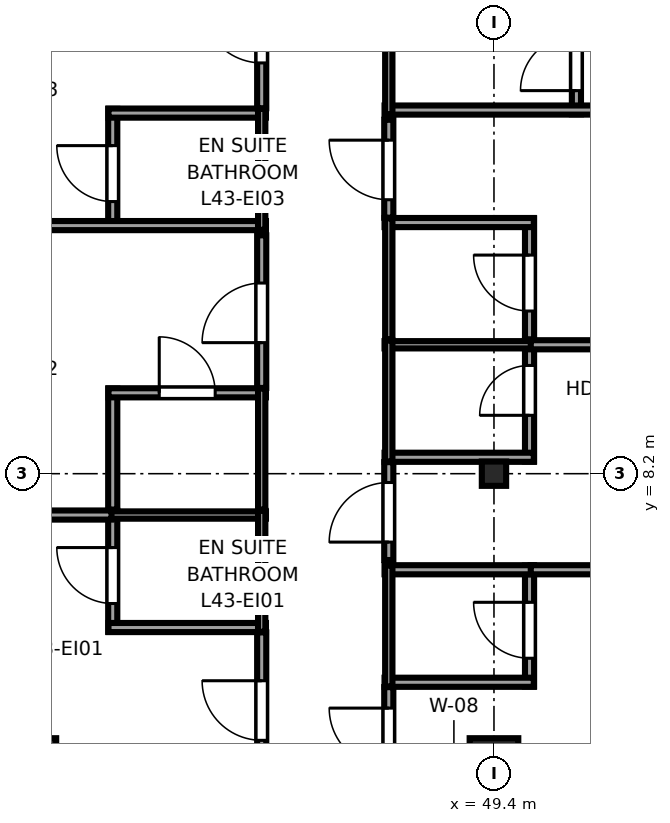
"""IFC4 building model, lengths in metres.
Left out: names, types, materials, properties, quantities, classifications, styles, units other than length and angle.
Written with IfcOpenShell. Run it as: python <this file> out.ifc"""

import sys

from ifc_helpers import new_model, si_unit, direction, frame, frame_2d, origin, origin_2d, place, context, subcontext, project, spatial, rectangle, i_section, extrude, source, transform, mapped, element, fill, save


model = new_model("IFC4")
c1 = context("Model", 3, precision=1e-05, world=origin(), true_north=direction((0.0, 1.0)))
c2 = subcontext(c1, "Body", "Model", "MODEL_VIEW")
j1 = project(units=[si_unit("LENGTHUNIT", "METRE"), si_unit("PLANEANGLEUNIT", "RADIAN")], contexts=[c1])
p1 = place(None, origin())
s1 = spatial("IfcSite", under=j1, at=p1, CompositionType="ELEMENT")
p2 = place(p1, origin())
s2 = spatial("IfcBuilding", under=s1, at=p2, CompositionType="ELEMENT")
p3 = place(p2, frame((0.0, 0.0, 164.8)))
s3 = spatial("IfcBuildingStorey", under=s2, at=p3, CompositionType="ELEMENT", Elevation=164.8)
m1 = source(origin(), c2, "Body", "SweptSolid", [
    extrude(rectangle(XDim=0.8, YDim=0.8, at=origin_2d()), origin(), (0.0, 0.0, 1.0), 3.55),
])
for number, where, z_axis, x_axis in (
    (1, (41.8, 3.45, 0.0), (0.0, 0.0, 1.0), (1.0, 0.0, 0.0)),
    (2, (49.4, 3.45, 0.0), (0.0, 0.0, 1.0), (1.0, 0.0, 0.0)),
):
    element("IfcColumn", number, at=place(p3, frame(where, z_axis=z_axis, x_axis=x_axis)), inside=s3, PredefinedType="COLUMN", context=c2, shape_type="MappedRepresentation", body=[
        mapped(m1, transform((0.0, 0.0, 0.0), x_axis=(1.0, 0.0, 0.0), y_axis=(0.0, 1.0, 0.0), z_axis=(0.0, 0.0, 1.0), scale=1.0)),
    ])
m2 = source(origin(), c2, "Body", "SweptSolid", [
    extrude(i_section(OverallWidth=0.4, OverallDepth=0.4, WebThickness=0.02, FlangeThickness=0.035, at=origin_2d()), origin(), (0.0, 0.0, 1.0), 3.55),
])
p4 = place(p3, frame((49.4, 8.2, 0.0), z_axis=(0.0, 0.0, 1.0), x_axis=(1.0, 0.0, 0.0)))
e3 = element("IfcColumn", 3, at=p4, inside=s3, PredefinedType="COLUMN", context=c2, shape_type="MappedRepresentation", body=[
    mapped(m2, transform((0.0, 0.0, 0.0), x_axis=(1.0, 0.0, 0.0), y_axis=(0.0, 1.0, 0.0), z_axis=(0.0, 0.0, 1.0), scale=1.0)),
])
p5 = place(p3, frame((43.13, 5.6, 0.0), z_axis=(0.0, 0.0, 1.0), x_axis=(0.0, 1.0, 0.0)))
e4 = element("IfcWall", 4, at=p5, inside=s3, PredefinedType="PARTITIONING", context=c2, shape_type="SweptSolid", body=[
    extrude(rectangle(XDim=1.99, YDim=0.15, at=frame_2d((0.995, 0.0))), origin(), (0.0, 0.0, 1.0), 3.37),
])
p6 = place(p5, frame((0.465, 0.0, 0.0)))
e5 = element("IfcOpeningElement", 5, at=p6, cuts=e4, PredefinedType="OPENING", context=c2, shape_type="SweptSolid", body=[
    extrude(rectangle(XDim=0.92, YDim=2.01, at=frame_2d((0.46, 1.005))), frame((0.0, 0.085, 0.0), z_axis=(0.0, -1.0, 0.0), x_axis=(1.0, 0.0, 0.0)), (0.0, 0.0, 1.0), 0.17),
])
p7 = place(p3, frame((43.06, 5.67, 0.0), z_axis=(0.0, 0.0, 1.0), x_axis=(1.0, 0.0, 0.0)))
e6 = element("IfcWall", 6, at=p7, inside=s3, PredefinedType="PARTITIONING", context=c2, shape_type="SweptSolid", body=[
    extrude(rectangle(XDim=2.59, YDim=0.15, at=frame_2d((1.295, 0.0))), origin(), (0.0, 0.0, 1.0), 3.37),
])
p8 = place(p3, frame((43.06, 7.52, 0.0), z_axis=(0.0, 0.0, 1.0), x_axis=(1.0, 0.0, 0.0)))
e7 = element("IfcWall", 7, at=p8, inside=s3, PredefinedType="PLUMBINGWALL", context=c2, shape_type="SweptSolid", body=[
    extrude(rectangle(XDim=2.59, YDim=0.12, at=frame_2d((1.295, 0.0))), origin(), (0.0, 0.0, 1.0), 3.37),
])
p9 = place(p3, frame((45.58, 5.6, 0.0), z_axis=(0.0, 0.0, 1.0), x_axis=(0.0, 1.0, 0.0)))
e8 = element("IfcWall", 8, at=p9, inside=s3, PredefinedType="PLUMBINGWALL", context=c2, shape_type="SweptSolid", body=[
    extrude(rectangle(XDim=1.99, YDim=0.12, at=frame_2d((0.995, 0.0))), origin(), (0.0, 0.0, 1.0), 3.37),
])
p10 = place(p3, frame((43.13, 7.61, 0.0), z_axis=(0.0, 0.0, 1.0), x_axis=(0.0, 1.0, 0.0)))
e9 = element("IfcWall", 9, at=p10, inside=s3, PredefinedType="PARTITIONING", context=c2, shape_type="SweptSolid", body=[
    extrude(rectangle(XDim=1.99, YDim=0.15, at=frame_2d((0.995, 0.0))), origin(), (0.0, 0.0, 1.0), 3.37),
])
p11 = place(p3, frame((43.06, 9.53, 0.0), z_axis=(0.0, 0.0, 1.0), x_axis=(1.0, 0.0, 0.0)))
e10 = element("IfcWall", 10, at=p11, inside=s3, PredefinedType="PARTITIONING", context=c2, shape_type="SweptSolid", body=[
    extrude(rectangle(XDim=2.59, YDim=0.15, at=frame_2d((1.295, 0.0))), origin(), (0.0, 0.0, 1.0), 3.37),
])
p12 = place(p11, frame((0.835, 0.0, 0.0)))
e11 = element("IfcOpeningElement", 11, at=p12, cuts=e10, PredefinedType="OPENING", context=c2, shape_type="SweptSolid", body=[
    extrude(rectangle(XDim=0.92, YDim=2.01, at=frame_2d((0.46, 1.005))), frame((0.0, 0.085, 0.0), z_axis=(0.0, -1.0, 0.0), x_axis=(1.0, 0.0, 0.0)), (0.0, 0.0, 1.0), 0.17),
])
p13 = place(p3, frame((45.58, 7.61, 0.0), z_axis=(0.0, 0.0, 1.0), x_axis=(0.0, 1.0, 0.0)))
e12 = element("IfcWall", 12, at=p13, inside=s3, PredefinedType="PLUMBINGWALL", context=c2, shape_type="SweptSolid", body=[
    extrude(rectangle(XDim=1.99, YDim=0.12, at=frame_2d((0.995, 0.0))), origin(), (0.0, 0.0, 1.0), 3.001),
])
p14 = place(p3, frame((43.13, 12.21, 0.0), z_axis=(0.0, 0.0, 1.0), x_axis=(0.0, 1.0, 0.0)))
e13 = element("IfcWall", 13, at=p14, inside=s3, PredefinedType="PARTITIONING", context=c2, shape_type="SweptSolid", body=[
    extrude(rectangle(XDim=1.99, YDim=0.15, at=frame_2d((0.995, 0.0))), origin(), (0.0, 0.0, 1.0), 3.37),
])
p15 = place(p14, frame((0.465, 0.0, 0.0)))
e14 = element("IfcOpeningElement", 14, at=p15, cuts=e13, PredefinedType="OPENING", context=c2, shape_type="SweptSolid", body=[
    extrude(rectangle(XDim=0.92, YDim=2.01, at=frame_2d((0.46, 1.005))), frame((0.0, 0.085, 0.0), z_axis=(0.0, -1.0, 0.0), x_axis=(1.0, 0.0, 0.0)), (0.0, 0.0, 1.0), 0.17),
])
p16 = place(p3, frame((34.65, 12.28, 0.0), z_axis=(0.0, 0.0, 1.0), x_axis=(1.0, 0.0, 0.0)))
e15 = element("IfcWall", 15, at=p16, inside=s3, PredefinedType="PARTITIONING", context=c2, shape_type="SweptSolid", body=[
    extrude(rectangle(XDim=11.0, YDim=0.15, at=frame_2d((5.5, 0.0))), origin(), (0.0, 0.0, 1.0), 3.37),
])
p17 = place(p3, frame((43.06, 14.13, 0.0), z_axis=(0.0, 0.0, 1.0), x_axis=(1.0, 0.0, 0.0)))
e16 = element("IfcWall", 16, at=p17, inside=s3, PredefinedType="PARTITIONING", context=c2, shape_type="SweptSolid", body=[
    extrude(rectangle(XDim=2.59, YDim=0.15, at=frame_2d((1.295, 0.0))), origin(), (0.0, 0.0, 1.0), 3.37),
])
p18 = place(p3, frame((45.58, 12.21, 0.0), z_axis=(0.0, 0.0, 1.0), x_axis=(0.0, 1.0, 0.0)))
e17 = element("IfcWall", 17, at=p18, inside=s3, PredefinedType="PLUMBINGWALL", context=c2, shape_type="SweptSolid", body=[
    extrude(rectangle(XDim=1.99, YDim=0.12, at=frame_2d((0.995, 0.0))), origin(), (0.0, 0.0, 1.0), 3.001),
])
p19 = place(p3, frame((49.985, 4.7, 0.0), z_axis=(0.0, 0.0, 1.0), x_axis=(0.0, 1.0, 0.0)))
e18 = element("IfcWall", 18, at=p19, inside=s3, PredefinedType="PARTITIONING", context=c2, shape_type="SweptSolid", body=[
    extrude(rectangle(XDim=1.99, YDim=0.15, at=frame_2d((0.995, 0.0))), origin(), (0.0, 0.0, 1.0), 3.37),
])
p20 = place(p19, frame((0.465, 0.0, 0.0)))
e19 = element("IfcOpeningElement", 19, at=p20, cuts=e18, PredefinedType="OPENING", context=c2, shape_type="SweptSolid", body=[
    extrude(rectangle(XDim=0.92, YDim=2.01, at=frame_2d((0.46, 1.005))), frame((0.0, 0.085, 0.0), z_axis=(0.0, -1.0, 0.0), x_axis=(1.0, 0.0, 0.0)), (0.0, 0.0, 1.0), 0.17),
])
p21 = place(p3, frame((47.6, 4.77, 0.0), z_axis=(0.0, 0.0, 1.0), x_axis=(1.0, 0.0, 0.0)))
e20 = element("IfcWall", 20, at=p21, inside=s3, PredefinedType="PARTITIONING", context=c2, shape_type="SweptSolid", body=[
    extrude(rectangle(XDim=2.455, YDim=0.15, at=frame_2d((1.228, 0.0))), origin(), (0.0, 0.0, 1.0), 2.832),
])
p22 = place(p3, frame((47.6, 6.62, 0.0), z_axis=(0.0, 0.0, 1.0), x_axis=(1.0, 0.0, 0.0)))
e21 = element("IfcWall", 21, at=p22, inside=s3, PredefinedType="PARTITIONING", context=c2, shape_type="SweptSolid", body=[
    extrude(rectangle(XDim=2.455, YDim=0.15, at=frame_2d((1.228, 0.0))), origin(), (0.0, 0.0, 1.0), 3.37),
])
p23 = place(p3, frame((47.67, 4.7, 0.0), z_axis=(0.0, 0.0, 1.0), x_axis=(0.0, 1.0, 0.0)))
e22 = element("IfcWall", 22, at=p23, inside=s3, PredefinedType="PLUMBINGWALL", context=c2, shape_type="SweptSolid", body=[
    extrude(rectangle(XDim=1.99, YDim=0.12, at=frame_2d((0.995, 0.0))), origin(), (0.0, 0.0, 1.0), 3.37),
])
p24 = place(p3, frame((49.985, 8.4, 0.0), z_axis=(0.0, 0.0, 1.0), x_axis=(0.0, 1.0, 0.0)))
e23 = element("IfcWall", 23, at=p24, inside=s3, PredefinedType="PARTITIONING", context=c2, shape_type="SweptSolid", body=[
    extrude(rectangle(XDim=1.99, YDim=0.15, at=frame_2d((0.995, 0.0))), origin(), (0.0, 0.0, 1.0), 3.37),
])
p25 = place(p24, frame((0.76, 0.0, 0.0)))
e24 = element("IfcOpeningElement", 24, at=p25, cuts=e23, PredefinedType="OPENING", context=c2, shape_type="SweptSolid", body=[
    extrude(rectangle(XDim=0.82, YDim=2.01, at=frame_2d((0.41, 1.005))), frame((0.0, 0.085, 0.0), z_axis=(0.0, -1.0, 0.0), x_axis=(1.0, 0.0, 0.0)), (0.0, 0.0, 1.0), 0.17),
])
p26 = place(p3, frame((47.6, 8.47, 0.0), z_axis=(0.0, 0.0, 1.0), x_axis=(1.0, 0.0, 0.0)))
e25 = element("IfcWall", 25, at=p26, inside=s3, PredefinedType="PARTITIONING", context=c2, shape_type="SweptSolid", body=[
    extrude(rectangle(XDim=2.455, YDim=0.15, at=frame_2d((1.228, 0.0))), origin(), (0.0, 0.0, 1.0), 3.37),
])
p27 = place(p3, frame((47.6, 10.32, 0.0), z_axis=(0.0, 0.0, 1.0), x_axis=(1.0, 0.0, 0.0)))
e26 = element("IfcWall", 26, at=p27, inside=s3, PredefinedType="PLUMBINGWALL", context=c2, shape_type="SweptSolid", body=[
    extrude(rectangle(XDim=2.455, YDim=0.12, at=frame_2d((1.228, 0.0))), origin(), (0.0, 0.0, 1.0), 3.37),
])
p28 = place(p3, frame((47.67, 8.4, 0.0), z_axis=(0.0, 0.0, 1.0), x_axis=(0.0, 1.0, 0.0)))
e27 = element("IfcWall", 27, at=p28, inside=s3, PredefinedType="PLUMBINGWALL", context=c2, shape_type="SweptSolid", body=[
    extrude(rectangle(XDim=1.99, YDim=0.12, at=frame_2d((0.995, 0.0))), origin(), (0.0, 0.0, 1.0), 3.37),
])
p29 = place(p3, frame((49.985, 10.41, 0.0), z_axis=(0.0, 0.0, 1.0), x_axis=(0.0, 1.0, 0.0)))
e28 = element("IfcWall", 28, at=p29, inside=s3, PredefinedType="PARTITIONING", context=c2, shape_type="SweptSolid", body=[
    extrude(rectangle(XDim=1.99, YDim=0.15, at=frame_2d((0.995, 0.0))), origin(), (0.0, 0.0, 1.0), 3.37),
])
p30 = place(p29, frame((0.465, 0.0, 0.0)))
e29 = element("IfcOpeningElement", 29, at=p30, cuts=e28, PredefinedType="OPENING", context=c2, shape_type="SweptSolid", body=[
    extrude(rectangle(XDim=0.92, YDim=2.01, at=frame_2d((0.46, 1.005))), frame((0.0, 0.085, 0.0), z_axis=(0.0, -1.0, 0.0), x_axis=(1.0, 0.0, 0.0)), (0.0, 0.0, 1.0), 0.17),
])
p31 = place(p3, frame((47.6, 12.33, 0.0), z_axis=(0.0, 0.0, 1.0), x_axis=(1.0, 0.0, 0.0)))
e30 = element("IfcWall", 30, at=p31, inside=s3, PredefinedType="PARTITIONING", context=c2, shape_type="SweptSolid", body=[
    extrude(rectangle(XDim=2.455, YDim=0.15, at=frame_2d((1.228, 0.0))), origin(), (0.0, 0.0, 1.0), 3.37),
])
p32 = place(p3, frame((47.67, 10.41, 0.0), z_axis=(0.0, 0.0, 1.0), x_axis=(0.0, 1.0, 0.0)))
e31 = element("IfcWall", 31, at=p32, inside=s3, PredefinedType="PLUMBINGWALL", context=c2, shape_type="SweptSolid", body=[
    extrude(rectangle(XDim=1.99, YDim=0.12, at=frame_2d((0.995, 0.0))), origin(), (0.0, 0.0, 1.0), 3.37),
])
p33 = place(p3, frame((50.756, 14.11, 0.0), z_axis=(0.0, 0.0, 1.0), x_axis=(0.0, 1.0, 0.0)))
e32 = element("IfcWall", 32, at=p33, inside=s3, PredefinedType="PARTITIONING", context=c2, shape_type="SweptSolid", body=[
    extrude(rectangle(XDim=1.839, YDim=0.15, at=frame_2d((0.919, 0.0))), origin(), (0.0, 0.0, 1.0), 3.37),
])
p34 = place(p33, frame((0.389, 0.0, 0.0)))
e33 = element("IfcOpeningElement", 33, at=p34, cuts=e32, PredefinedType="OPENING", context=c2, shape_type="SweptSolid", body=[
    extrude(rectangle(XDim=0.92, YDim=2.01, at=frame_2d((0.46, 1.005))), frame((0.0, 0.085, 0.0), z_axis=(0.0, -1.0, 0.0), x_axis=(1.0, 0.0, 0.0)), (0.0, 0.0, 1.0), 0.17),
])
p35 = place(p3, frame((47.6, 14.18, 0.0), z_axis=(0.0, 0.0, 1.0), x_axis=(1.0, 0.0, 0.0)))
e34 = element("IfcWall", 34, at=p35, inside=s3, PredefinedType="PARTITIONING", context=c2, shape_type="SweptSolid", body=[
    extrude(rectangle(XDim=6.395, YDim=0.15, at=frame_2d((3.198, 0.0))), origin(), (0.0, 0.0, 1.0), 3.37),
])
p36 = place(p3, frame((47.67, 14.11, 0.0), z_axis=(0.0, 0.0, 1.0), x_axis=(0.0, 1.0, 0.0)))
e35 = element("IfcWall", 35, at=p36, inside=s3, PredefinedType="PLUMBINGWALL", context=c2, shape_type="SweptSolid", body=[
    extrude(rectangle(XDim=1.839, YDim=0.12, at=frame_2d((0.919, 0.0))), origin(), (0.0, 0.0, 1.0), 3.37),
])
p37 = place(p3, frame((45.58, 3.005, 0.0), z_axis=(0.0, 0.0, 1.0), x_axis=(0.0, 1.0, 0.0)))
e36 = element("IfcWall", 36, at=p37, inside=s3, PredefinedType="PARTITIONING", context=c2, shape_type="SweptSolid", body=[
    extrude(rectangle(XDim=2.585, YDim=0.15, at=frame_2d((1.292, 0.0))), origin(), (0.0, 0.0, 1.0), 3.37),
])
p38 = place(p37, frame((0.81, 0.0, 0.0)))
e37 = element("IfcOpeningElement", 37, at=p38, cuts=e36, PredefinedType="OPENING", context=c2, shape_type="SweptSolid", body=[
    extrude(rectangle(XDim=0.98, YDim=2.12, at=frame_2d((0.49, 1.06))), frame((0.0, 0.085, 0.0), z_axis=(0.0, -1.0, 0.0), x_axis=(1.0, 0.0, 0.0)), (0.0, 0.0, 1.0), 0.17),
])
p39 = place(p3, frame((34.65, 7.52, 0.0), z_axis=(0.0, 0.0, 1.0), x_axis=(1.0, 0.0, 0.0)))
e38 = element("IfcWall", 38, at=p39, inside=s3, PredefinedType="PARTITIONING", context=c2, shape_type="SweptSolid", body=[
    extrude(rectangle(XDim=8.46, YDim=0.15, at=frame_2d((4.23, 0.0))), origin(), (0.0, 0.0, 1.0), 3.37),
])
p40 = place(p3, frame((45.58, 9.61, 0.0), z_axis=(0.0, 0.0, 1.0), x_axis=(0.0, 1.0, 0.0)))
e39 = element("IfcWall", 39, at=p40, inside=s3, PredefinedType="PARTITIONING", context=c2, shape_type="SweptSolid", body=[
    extrude(rectangle(XDim=2.51, YDim=0.15, at=frame_2d((1.255, 0.0))), origin(), (0.0, 0.0, 1.0), 3.001),
])
p41 = place(p40, frame((0.745, 0.0, 0.0)))
e40 = element("IfcOpeningElement", 40, at=p41, cuts=e39, PredefinedType="OPENING", context=c2, shape_type="SweptSolid", body=[
    extrude(rectangle(XDim=0.98, YDim=2.12, at=frame_2d((0.49, 1.06))), frame((0.0, 0.085, 0.0), z_axis=(0.0, -1.0, 0.0), x_axis=(1.0, 0.0, 0.0)), (0.0, 0.0, 1.0), 0.17),
])
p42 = place(p3, frame((45.58, 14.21, 0.0), z_axis=(0.0, 0.0, 1.0), x_axis=(0.0, 1.0, 0.0)))
e41 = element("IfcWall", 41, at=p42, inside=s3, PredefinedType="PARTITIONING", context=c2, shape_type="SweptSolid", body=[
    extrude(rectangle(XDim=2.51, YDim=0.15, at=frame_2d((1.255, 0.0))), origin(), (0.0, 0.0, 1.0), 3.001),
])
p43 = place(p42, frame((0.745, 0.0, 0.0)))
e42 = element("IfcOpeningElement", 42, at=p43, cuts=e41, PredefinedType="OPENING", context=c2, shape_type="SweptSolid", body=[
    extrude(rectangle(XDim=0.98, YDim=2.12, at=frame_2d((0.49, 1.06))), frame((0.0, 0.085, 0.0), z_axis=(0.0, -1.0, 0.0), x_axis=(1.0, 0.0, 0.0)), (0.0, 0.0, 1.0), 0.17),
])
p44 = place(p3, frame((47.67, 3.005, 0.0), z_axis=(0.0, 0.0, 1.0), x_axis=(0.0, 1.0, 0.0)))
e43 = element("IfcWall", 43, at=p44, inside=s3, PredefinedType="PARTITIONING", context=c2, shape_type="SweptSolid", body=[
    extrude(rectangle(XDim=1.685, YDim=0.15, at=frame_2d((0.843, 0.0))), origin(), (0.0, 0.0, 1.0), 3.37),
])
p45 = place(p44, frame((0.36, 0.0, 0.0)))
e44 = element("IfcOpeningElement", 44, at=p45, cuts=e43, PredefinedType="OPENING", context=c2, shape_type="SweptSolid", body=[
    extrude(rectangle(XDim=0.98, YDim=2.12, at=frame_2d((0.49, 1.06))), frame((0.0, 0.085, 0.0), z_axis=(0.0, -1.0, 0.0), x_axis=(1.0, 0.0, 0.0)), (0.0, 0.0, 1.0), 0.17),
])
p46 = place(p3, frame((50.005, 6.62, 0.0), z_axis=(0.0, 0.0, 1.0), x_axis=(1.0, 0.0, 0.0)))
e45 = element("IfcWall", 45, at=p46, inside=s3, PredefinedType="PARTITIONING", context=c2, shape_type="SweptSolid", body=[
    extrude(rectangle(XDim=3.883, YDim=0.15, at=frame_2d((1.941, 0.0))), origin(), (0.0, 0.0, 1.0), 3.37),
])
p47 = place(p3, frame((47.67, 6.78, 0.0), z_axis=(0.0, 0.0, 1.0), x_axis=(0.0, 1.0, 0.0)))
e46 = element("IfcWall", 46, at=p47, inside=s3, PredefinedType="PARTITIONING", context=c2, shape_type="SweptSolid", body=[
    extrude(rectangle(XDim=1.61, YDim=0.15, at=frame_2d((0.805, 0.0))), origin(), (0.0, 0.0, 1.0), 3.37),
])
p48 = place(p47, frame((0.295, 0.0, 0.0)))
e47 = element("IfcOpeningElement", 47, at=p48, cuts=e46, PredefinedType="OPENING", context=c2, shape_type="SweptSolid", body=[
    extrude(rectangle(XDim=0.98, YDim=2.12, at=frame_2d((0.49, 1.06))), frame((0.0, 0.085, 0.0), z_axis=(0.0, -1.0, 0.0), x_axis=(1.0, 0.0, 0.0)), (0.0, 0.0, 1.0), 0.17),
])
p49 = place(p3, frame((50.005, 10.32, 0.0), z_axis=(0.0, 0.0, 1.0), x_axis=(1.0, 0.0, 0.0)))
e48 = element("IfcWall", 48, at=p49, inside=s3, PredefinedType="PARTITIONING", context=c2, shape_type="SweptSolid", body=[
    extrude(rectangle(XDim=3.99, YDim=0.15, at=frame_2d((1.995, 0.0))), origin(), (0.0, 0.0, 1.0), 3.37),
])
p50 = place(p3, frame((47.67, 12.41, 0.0), z_axis=(0.0, 0.0, 1.0), x_axis=(0.0, 1.0, 0.0)))
e49 = element("IfcWall", 49, at=p50, inside=s3, PredefinedType="PARTITIONING", context=c2, shape_type="SweptSolid", body=[
    extrude(rectangle(XDim=1.61, YDim=0.15, at=frame_2d((0.805, 0.0))), origin(), (0.0, 0.0, 1.0), 3.37),
])
p51 = place(p50, frame((0.295, 0.0, 0.0)))
e50 = element("IfcOpeningElement", 50, at=p51, cuts=e49, PredefinedType="OPENING", context=c2, shape_type="SweptSolid", body=[
    extrude(rectangle(XDim=0.98, YDim=2.12, at=frame_2d((0.49, 1.06))), frame((0.0, 0.085, 0.0), z_axis=(0.0, -1.0, 0.0), x_axis=(1.0, 0.0, 0.0)), (0.0, 0.0, 1.0), 0.17),
])
m3 = source(origin(), c2, "Body", "SweptSolid", [
    extrude(rectangle(XDim=0.92, YDim=2.01, at=frame_2d((0.46, 1.005))), frame((0.0, 0.025, 0.0), z_axis=(0.0, -1.0, 0.0), x_axis=(1.0, 0.0, 0.0)), (0.0, 0.0, 1.0), 0.05),
])
p52 = place(p6, origin())
e51 = element("IfcDoor", 51, at=p52, inside=s3, OperationType="SINGLE_SWING_RIGHT", PredefinedType="DOOR", context=c2, shape_type="MappedRepresentation", body=[
    mapped(m3, transform((0.0, 0.0, 0.0), x_axis=(1.0, 0.0, 0.0), y_axis=(0.0, 1.0, 0.0), z_axis=(0.0, 0.0, 1.0), scale=1.0)),
])
fill(e5, e51)
p53 = place(p12, origin())
e52 = element("IfcDoor", 52, at=p53, inside=s3, OperationType="SINGLE_SWING_LEFT", PredefinedType="DOOR", context=c2, shape_type="MappedRepresentation", body=[
    mapped(m3, transform((0.0, 0.0, 0.0), x_axis=(1.0, 0.0, 0.0), y_axis=(0.0, 1.0, 0.0), z_axis=(0.0, 0.0, 1.0), scale=1.0)),
])
fill(e11, e52)
p54 = place(p15, origin())
e53 = element("IfcDoor", 53, at=p54, inside=s3, OperationType="SINGLE_SWING_RIGHT", PredefinedType="DOOR", context=c2, shape_type="MappedRepresentation", body=[
    mapped(m3, transform((0.0, 0.0, 0.0), x_axis=(1.0, 0.0, 0.0), y_axis=(0.0, 1.0, 0.0), z_axis=(0.0, 0.0, 1.0), scale=1.0)),
])
fill(e14, e53)
p55 = place(p20, origin())
e54 = element("IfcDoor", 54, at=p55, inside=s3, OperationType="SINGLE_SWING_RIGHT", PredefinedType="DOOR", context=c2, shape_type="MappedRepresentation", body=[
    mapped(m3, transform((0.0, 0.0, 0.0), x_axis=(1.0, 0.0, 0.0), y_axis=(0.0, 1.0, 0.0), z_axis=(0.0, 0.0, 1.0), scale=1.0)),
])
fill(e19, e54)
m4 = source(origin(), c2, "Body", "SweptSolid", [
    extrude(rectangle(XDim=0.82, YDim=2.01, at=frame_2d((0.41, 1.005))), frame((0.0, 0.025, 0.0), z_axis=(0.0, -1.0, 0.0), x_axis=(1.0, 0.0, 0.0)), (0.0, 0.0, 1.0), 0.05),
])
p56 = place(p25, origin())
e55 = element("IfcDoor", 55, at=p56, inside=s3, OperationType="SINGLE_SWING_LEFT", PredefinedType="DOOR", context=c2, shape_type="MappedRepresentation", body=[
    mapped(m4, transform((0.0, 0.0, 0.0), x_axis=(1.0, 0.0, 0.0), y_axis=(0.0, 1.0, 0.0), z_axis=(0.0, 0.0, 1.0), scale=1.0)),
])
fill(e24, e55)
p57 = place(p30, origin())
e56 = element("IfcDoor", 56, at=p57, inside=s3, OperationType="SINGLE_SWING_RIGHT", PredefinedType="DOOR", context=c2, shape_type="MappedRepresentation", body=[
    mapped(m3, transform((0.0, 0.0, 0.0), x_axis=(1.0, 0.0, 0.0), y_axis=(0.0, 1.0, 0.0), z_axis=(0.0, 0.0, 1.0), scale=1.0)),
])
fill(e29, e56)
p58 = place(p34, origin())
e57 = element("IfcDoor", 57, at=p58, inside=s3, OperationType="SINGLE_SWING_LEFT", PredefinedType="DOOR", context=c2, shape_type="MappedRepresentation", body=[
    mapped(m3, transform((0.0, 0.0, 0.0), x_axis=(1.0, 0.0, 0.0), y_axis=(0.0, 1.0, 0.0), z_axis=(0.0, 0.0, 1.0), scale=1.0)),
])
fill(e33, e57)
m5 = source(origin(), c2, "Body", "SweptSolid", [
    extrude(rectangle(XDim=0.98, YDim=2.12, at=frame_2d((0.49, 1.06))), frame((0.0, 0.025, 0.0), z_axis=(0.0, -1.0, 0.0), x_axis=(1.0, 0.0, 0.0)), (0.0, 0.0, 1.0), 0.05),
])
p59 = place(p38, origin())
e58 = element("IfcDoor", 58, at=p59, inside=s3, OperationType="SINGLE_SWING_RIGHT", PredefinedType="DOOR", context=c2, shape_type="MappedRepresentation", body=[
    mapped(m5, transform((0.0, 0.0, 0.0), x_axis=(1.0, 0.0, 0.0), y_axis=(0.0, 1.0, 0.0), z_axis=(0.0, 0.0, 1.0), scale=1.0)),
])
fill(e37, e58)
p60 = place(p41, origin())
e59 = element("IfcDoor", 59, at=p60, inside=s3, OperationType="SINGLE_SWING_LEFT", PredefinedType="DOOR", context=c2, shape_type="MappedRepresentation", body=[
    mapped(m5, transform((0.0, 0.0, 0.0), x_axis=(1.0, 0.0, 0.0), y_axis=(0.0, 1.0, 0.0), z_axis=(0.0, 0.0, 1.0), scale=1.0)),
])
fill(e40, e59)
p61 = place(p43, origin())
e60 = element("IfcDoor", 60, at=p61, inside=s3, OperationType="SINGLE_SWING_RIGHT", PredefinedType="DOOR", context=c2, shape_type="MappedRepresentation", body=[
    mapped(m5, transform((0.0, 0.0, 0.0), x_axis=(1.0, 0.0, 0.0), y_axis=(0.0, 1.0, 0.0), z_axis=(0.0, 0.0, 1.0), scale=1.0)),
])
fill(e42, e60)
p62 = place(p45, origin())
e61 = element("IfcDoor", 61, at=p62, inside=s3, OperationType="SINGLE_SWING_RIGHT", PredefinedType="DOOR", context=c2, shape_type="MappedRepresentation", body=[
    mapped(m5, transform((0.0, 0.0, 0.0), x_axis=(1.0, 0.0, 0.0), y_axis=(0.0, 1.0, 0.0), z_axis=(0.0, 0.0, 1.0), scale=1.0)),
])
fill(e44, e61)
p63 = place(p48, origin())
e62 = element("IfcDoor", 62, at=p63, inside=s3, OperationType="SINGLE_SWING_LEFT", PredefinedType="DOOR", context=c2, shape_type="MappedRepresentation", body=[
    mapped(m5, transform((0.0, 0.0, 0.0), x_axis=(1.0, 0.0, 0.0), y_axis=(0.0, 1.0, 0.0), z_axis=(0.0, 0.0, 1.0), scale=1.0)),
])
fill(e47, e62)
p64 = place(p51, origin())
e63 = element("IfcDoor", 63, at=p64, inside=s3, OperationType="SINGLE_SWING_RIGHT", PredefinedType="DOOR", context=c2, shape_type="MappedRepresentation", body=[
    mapped(m5, transform((0.0, 0.0, 0.0), x_axis=(1.0, 0.0, 0.0), y_axis=(0.0, 1.0, 0.0), z_axis=(0.0, 0.0, 1.0), scale=1.0)),
])
fill(e50, e63)
save(model, sys.argv[1])
